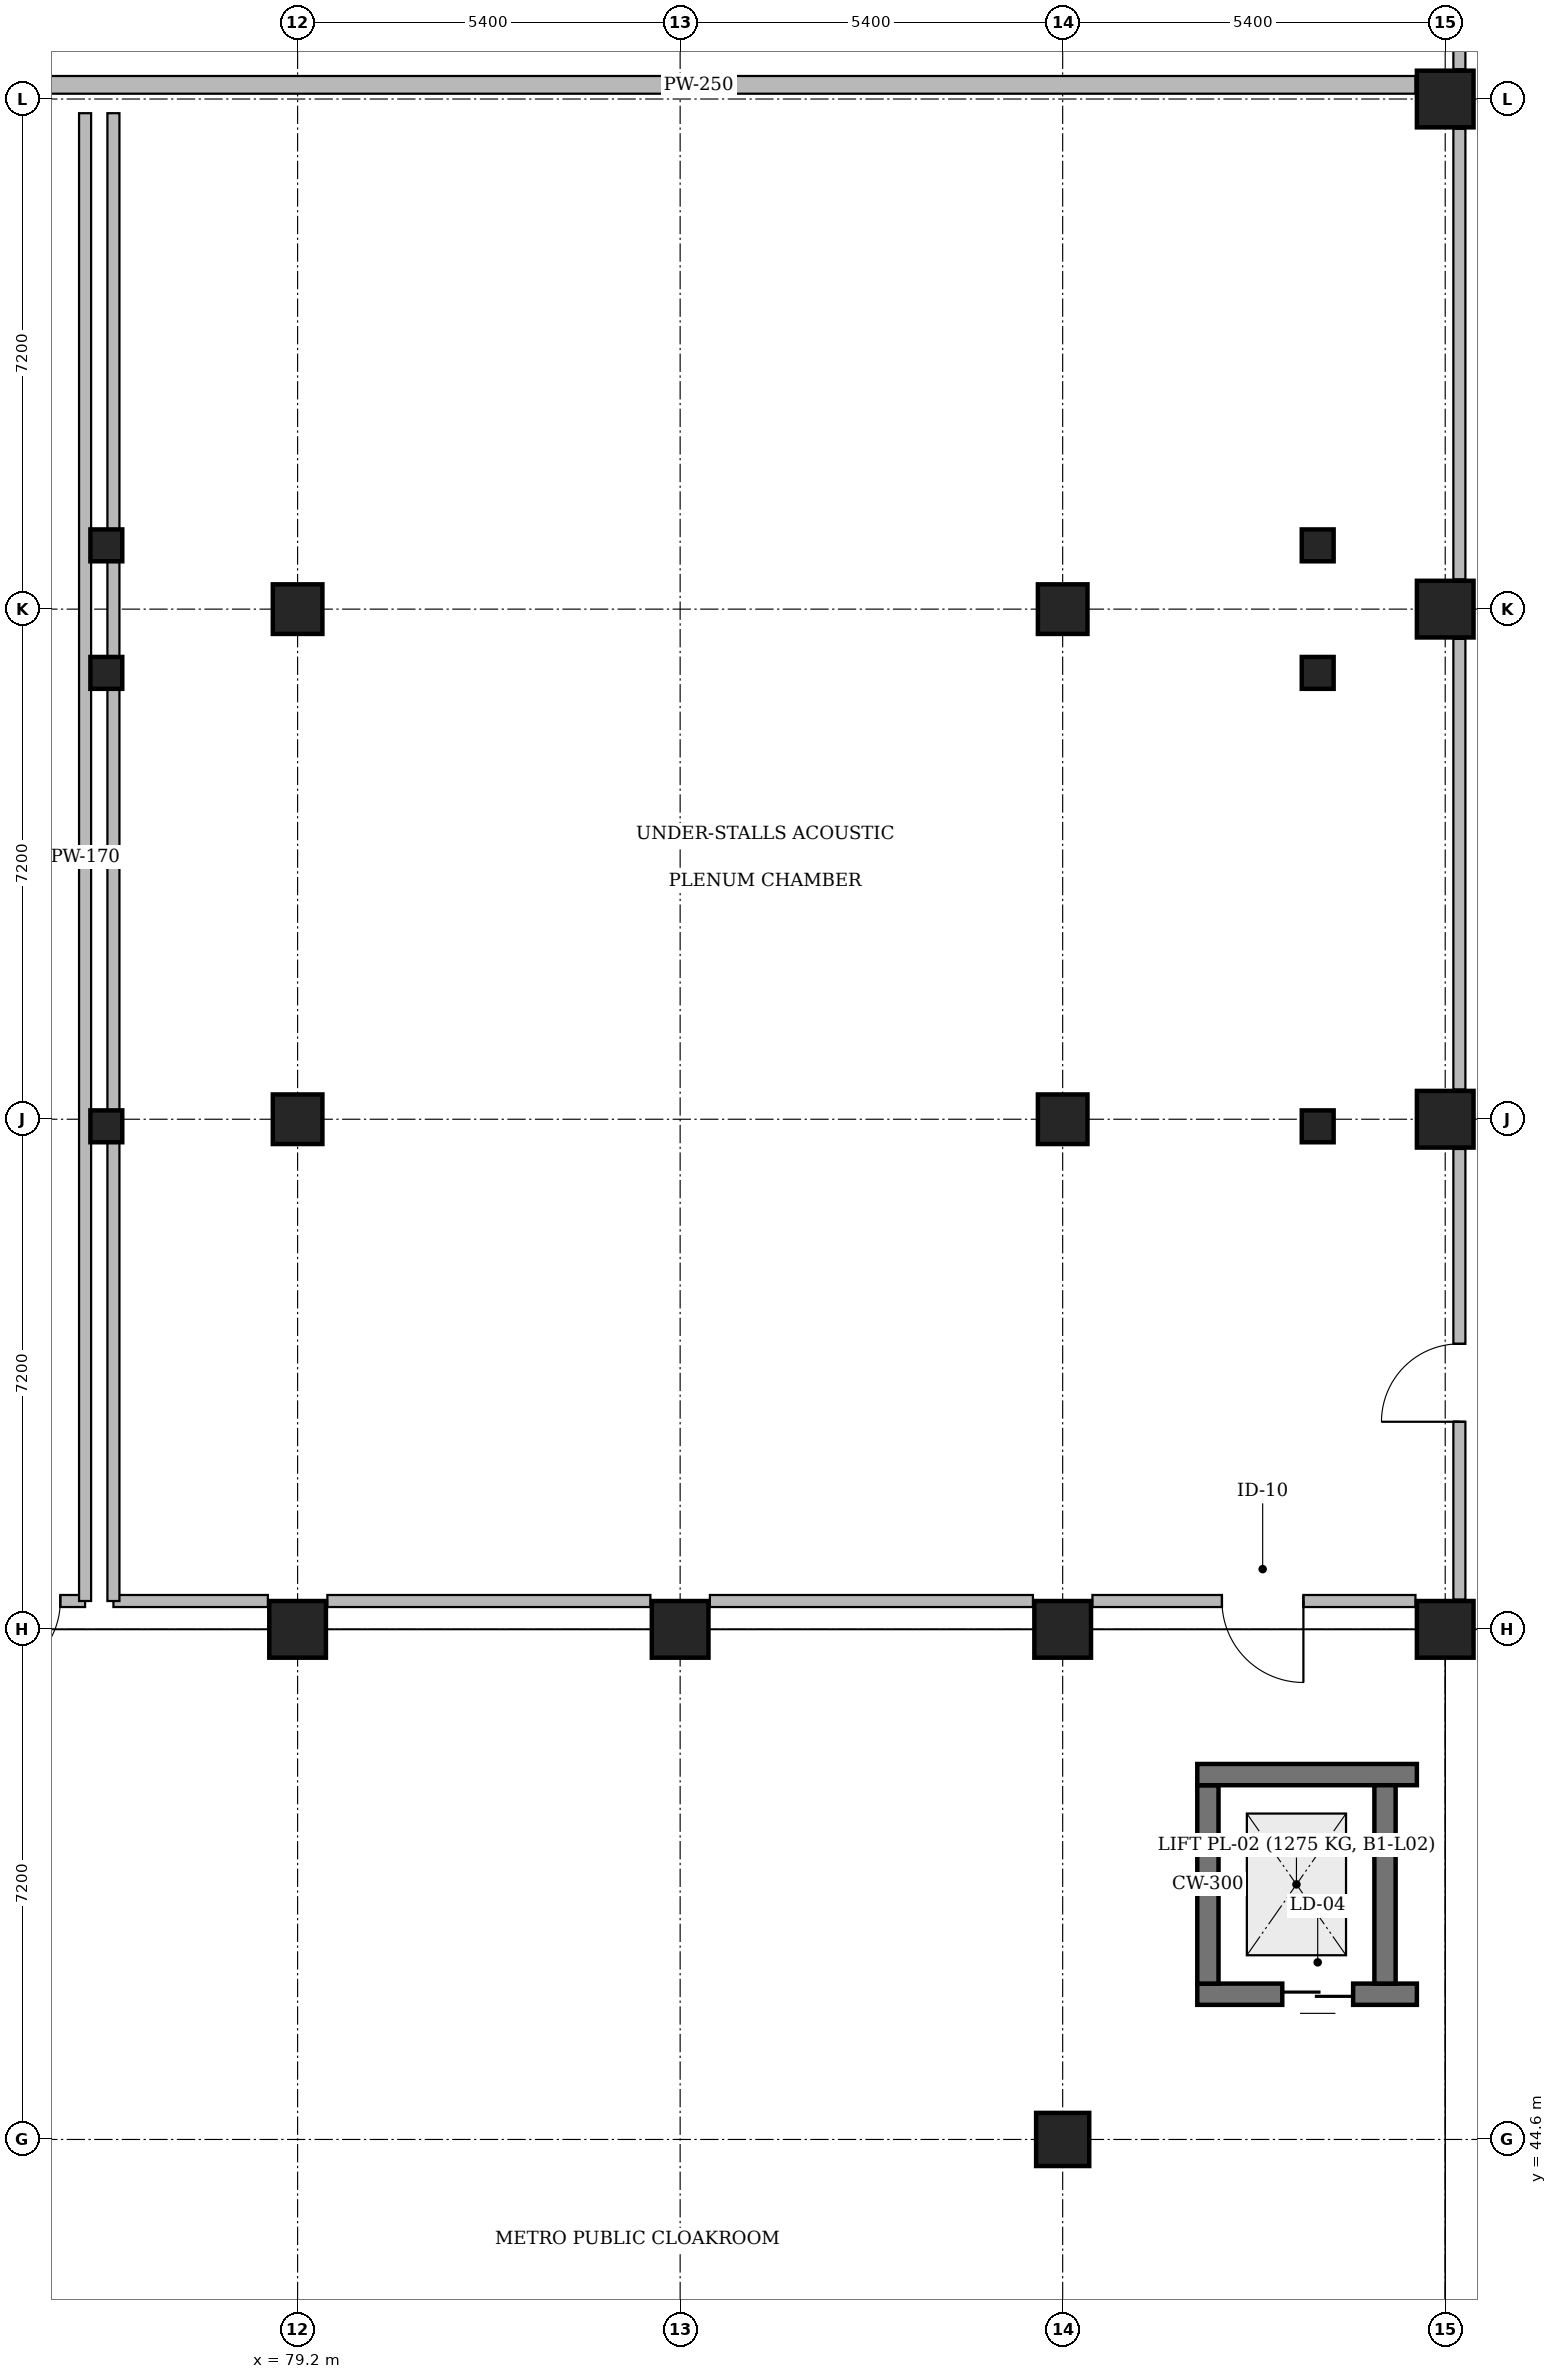
"""IFC4 building model, lengths in metres.
Left out: names, types, materials, properties, quantities, classifications, styles, units other than length and angle.
Written with IfcOpenShell. Run it as: python <this file> out.ifc"""

import sys

from ifc_helpers import new_model, si_unit, direction, frame, frame_2d, origin, origin_2d, place, context, subcontext, project, spatial, rectangle, circle, extrude, element, fill, save


model = new_model("IFC4")
c1 = context("Model", 3, precision=1e-05, world=origin(), true_north=direction((0.0, 1.0)))
c2 = subcontext(c1, "Body", "Model", "MODEL_VIEW")
j1 = project(units=[si_unit("LENGTHUNIT", "METRE"), si_unit("PLANEANGLEUNIT", "RADIAN")], contexts=[c1])
p1 = place(None, origin())
s1 = spatial("IfcSite", under=j1, at=p1, CompositionType="ELEMENT")
p2 = place(p1, origin())
s2 = spatial("IfcBuilding", under=s1, at=p2, CompositionType="ELEMENT")
p3 = place(p2, frame((0.0, 0.0, -4.8)))
s3 = spatial("IfcBuildingStorey", under=s2, at=p3, CompositionType="ELEMENT", Elevation=-4.8)
p4 = place(p3, frame((79.2, 51.8, 0.0), z_axis=(0.0, 0.0, 1.0), x_axis=(1.0, 0.0, 0.0)))
e1 = element("IfcColumn", 1, at=p4, inside=s3, PredefinedType="COLUMN", context=c2, shape_type="SweptSolid", body=[
    extrude(rectangle(XDim=0.8, YDim=0.8, at=origin_2d()), origin(), (0.0, 0.0, 1.0), 4.8),
])
for number, where, z_axis, x_axis in (
    (2, (79.2, 59.0, 0.0), (0.0, 0.0, 1.0), (1.0, 0.0, 0.0)),
    (3, (79.2, 66.2, 0.0), (0.0, 0.0, 1.0), (1.0, 0.0, 0.0)),
):
    element("IfcColumn", number, at=place(p3, frame(where, z_axis=z_axis, x_axis=x_axis)), inside=s3, PredefinedType="COLUMN", context=c2, shape_type="SweptSolid", body=[
        extrude(rectangle(XDim=0.7, YDim=0.7, at=origin_2d()), origin(), (0.0, 0.0, 1.0), 4.8),
    ])
p5 = place(p3, frame((84.6, 51.8, 0.0), z_axis=(0.0, 0.0, 1.0), x_axis=(1.0, 0.0, 0.0)))
e4 = element("IfcColumn", 4, at=p5, inside=s3, PredefinedType="COLUMN", context=c2, shape_type="SweptSolid", body=[
    extrude(rectangle(XDim=0.8, YDim=0.8, at=origin_2d()), origin(), (0.0, 0.0, 1.0), 4.8),
])
p6 = place(p3, frame((90.0, 44.6, 0.0), z_axis=(0.0, 0.0, 1.0), x_axis=(1.0, 0.0, 0.0)))
e5 = element("IfcColumn", 5, at=p6, inside=s3, PredefinedType="COLUMN", context=c2, shape_type="SweptSolid", body=[
    extrude(circle(Radius=0.375, at=origin_2d()), origin(), (0.0, 0.0, 1.0), 4.8),
])
p7 = place(p3, frame((90.0, 51.8, 0.0), z_axis=(0.0, 0.0, 1.0), x_axis=(1.0, 0.0, 0.0)))
e6 = element("IfcColumn", 6, at=p7, inside=s3, PredefinedType="COLUMN", context=c2, shape_type="SweptSolid", body=[
    extrude(rectangle(XDim=0.8, YDim=0.8, at=origin_2d()), origin(), (0.0, 0.0, 1.0), 4.8),
])
for number, where, z_axis, x_axis in (
    (7, (90.0, 59.0, 0.0), (0.0, 0.0, 1.0), (1.0, 0.0, 0.0)),
    (8, (90.0, 66.2, 0.0), (0.0, 0.0, 1.0), (1.0, 0.0, 0.0)),
):
    element("IfcColumn", number, at=place(p3, frame(where, z_axis=z_axis, x_axis=x_axis)), inside=s3, PredefinedType="COLUMN", context=c2, shape_type="SweptSolid", body=[
        extrude(rectangle(XDim=0.7, YDim=0.7, at=origin_2d()), origin(), (0.0, 0.0, 1.0), 4.8),
    ])
for number, where, z_axis, x_axis in (
    (9, (95.4, 51.8, 0.0), (0.0, 0.0, 1.0), (1.0, 0.0, 0.0)),
    (10, (95.4, 59.0, 0.0), (0.0, 0.0, 1.0), (1.0, 0.0, 0.0)),
    (11, (95.4, 66.2, 0.0), (0.0, 0.0, 1.0), (1.0, 0.0, 0.0)),
    (12, (95.4, 73.4, 0.0), (0.0, 0.0, 1.0), (1.0, 0.0, 0.0)),
):
    element("IfcColumn", number, at=place(p3, frame(where, z_axis=z_axis, x_axis=x_axis)), inside=s3, PredefinedType="COLUMN", context=c2, shape_type="SweptSolid", body=[
        extrude(rectangle(XDim=0.8, YDim=0.8, at=origin_2d()), origin(), (0.0, 0.0, 1.0), 4.8),
    ])
for number, where, z_axis, x_axis in (
    (13, (76.5, 67.1, 0.0), (0.0, 0.0, 1.0), (1.0, 0.0, 0.0)),
    (14, (93.6, 67.1, 0.0), (0.0, 0.0, 1.0), (1.0, 0.0, 0.0)),
    (15, (76.5, 65.3, 0.0), (0.0, 0.0, 1.0), (1.0, 0.0, 0.0)),
    (16, (93.6, 65.3, 0.0), (0.0, 0.0, 1.0), (1.0, 0.0, 0.0)),
    (17, (76.5, 58.9, 0.0), (0.0, 0.0, 1.0), (1.0, 0.0, 0.0)),
    (18, (93.6, 58.9, 0.0), (0.0, 0.0, 1.0), (1.0, 0.0, 0.0)),
):
    element("IfcColumn", number, at=place(p3, frame(where, z_axis=z_axis, x_axis=x_axis)), inside=s3, PredefinedType="COLUMN", context=c2, shape_type="SweptSolid", body=[
        extrude(rectangle(XDim=0.45, YDim=0.45, at=origin_2d()), origin(), (0.0, 0.0, 1.0), 4.8),
    ])
p8 = place(p3, frame((95.0, 46.65, 0.0), z_axis=(0.0, 0.0, 1.0), x_axis=(-1.0, 0.0, 0.0)))
e19 = element("IfcWall", 19, at=p8, inside=s3, PredefinedType="SOLIDWALL", context=c2, shape_type="SweptSolid", body=[
    extrude(rectangle(XDim=3.1, YDim=0.3, at=frame_2d((1.55, 0.0))), origin(), (0.0, 0.0, 1.0), 4.8),
])
p9 = place(p8, frame((0.9, 0.0, 0.0)))
e20 = element("IfcOpeningElement", 20, at=p9, cuts=e19, PredefinedType="OPENING", context=c2, shape_type="SweptSolid", body=[
    extrude(rectangle(XDim=1.0, YDim=2.1, at=frame_2d((0.5, 1.05))), frame((0.0, 0.17, 0.0), z_axis=(0.0, -1.0, 0.0), x_axis=(1.0, 0.0, 0.0)), (0.0, 0.0, 1.0), 0.34),
])
p10 = place(p3, frame((92.05, 46.8, 0.0), z_axis=(0.0, 0.0, 1.0), x_axis=(0.0, 1.0, 0.0)))
e21 = element("IfcWall", 21, at=p10, inside=s3, PredefinedType="SOLIDWALL", context=c2, shape_type="SweptSolid", body=[
    extrude(rectangle(XDim=2.8, YDim=0.3, at=frame_2d((1.4, 0.0))), origin(), (0.0, 0.0, 1.0), 4.8),
])
p11 = place(p3, frame((91.9, 49.75, 0.0), z_axis=(0.0, 0.0, 1.0), x_axis=(1.0, 0.0, 0.0)))
e22 = element("IfcWall", 22, at=p11, inside=s3, PredefinedType="SOLIDWALL", context=c2, shape_type="SweptSolid", body=[
    extrude(rectangle(XDim=3.1, YDim=0.3, at=frame_2d((1.55, 0.0))), origin(), (0.0, 0.0, 1.0), 4.8),
])
p12 = place(p3, frame((94.55, 49.6, 0.0), z_axis=(0.0, 0.0, 1.0), x_axis=(0.0, -1.0, 0.0)))
e23 = element("IfcWall", 23, at=p12, inside=s3, PredefinedType="SOLIDWALL", context=c2, shape_type="SweptSolid", body=[
    extrude(rectangle(XDim=2.8, YDim=0.3, at=frame_2d((1.4, 0.0))), origin(), (0.0, 0.0, 1.0), 4.8),
])
p13 = place(p3, frame((94.98, 73.6, 0.0), z_axis=(0.0, 0.0, 1.0), x_axis=(-1.0, 0.0, 0.0)))
e24 = element("IfcWall", 24, at=p13, inside=s3, PredefinedType="PARTITIONING", context=c2, shape_type="SweptSolid", body=[
    extrude(rectangle(XDim=36.96, YDim=0.25, at=frame_2d((18.48, 0.0))), origin(), (0.0, 0.0, 1.0), 4.52),
])
p14 = place(p13, frame((20.24, 0.0, 0.0)))
e25 = element("IfcOpeningElement", 25, at=p14, cuts=e24, PredefinedType="OPENING", context=c2, shape_type="SweptSolid", body=[
    extrude(rectangle(XDim=1.95, YDim=2.4, at=frame_2d((0.975, 1.2))), frame((0.0, 0.145, 0.0), z_axis=(0.0, -1.0, 0.0), x_axis=(1.0, 0.0, 0.0)), (0.0, 0.0, 1.0), 0.29),
])
p15 = place(p3, frame((76.2, 52.2, 0.0), z_axis=(0.0, 0.0, 1.0), x_axis=(-1.0, 0.0, 0.0)))
e26 = element("IfcWall", 26, at=p15, inside=s3, PredefinedType="PARTITIONING", context=c2, shape_type="SweptSolid", body=[
    extrude(rectangle(XDim=1.98, YDim=0.17, at=frame_2d((0.99, 0.0))), origin(), (0.0, 0.0, 1.0), 3.84),
])
p16 = place(p15, frame((0.35, 0.0, 0.0)))
e27 = element("IfcOpeningElement", 27, at=p16, cuts=e26, PredefinedType="OPENING", context=c2, shape_type="SweptSolid", body=[
    extrude(rectangle(XDim=1.1, YDim=2.1, at=frame_2d((0.55, 1.05))), frame((0.0, 0.105, 0.0), z_axis=(0.0, -1.0, 0.0), x_axis=(1.0, 0.0, 0.0)), (0.0, 0.0, 1.0), 0.21),
])
p17 = place(p3, frame((76.2, 73.2, 0.0), z_axis=(0.0, 0.0, 1.0), x_axis=(0.0, -1.0, 0.0)))
e28 = element("IfcWall", 28, at=p17, inside=s3, PredefinedType="PARTITIONING", context=c2, shape_type="SweptSolid", body=[
    extrude(rectangle(XDim=21.0, YDim=0.17, at=frame_2d((10.5, 0.0))), origin(), (0.0, 0.0, 1.0), 4.04),
])
p18 = place(p3, frame((94.98, 52.2, 0.0), z_axis=(0.0, 0.0, 1.0), x_axis=(-1.0, 0.0, 0.0)))
e29 = element("IfcWall", 29, at=p18, inside=s3, PredefinedType="PARTITIONING", context=c2, shape_type="SweptSolid", body=[
    extrude(rectangle(XDim=4.56, YDim=0.17, at=frame_2d((2.28, 0.0))), origin(), (0.0, 0.0, 1.0), 3.84),
])
p19 = place(p18, frame((1.582, 0.0, 0.0)))
e30 = element("IfcOpeningElement", 30, at=p19, cuts=e29, PredefinedType="OPENING", context=c2, shape_type="SweptSolid", body=[
    extrude(rectangle(XDim=1.15, YDim=2.15, at=frame_2d((0.575, 1.075))), frame((0.0, 0.105, 0.0), z_axis=(0.0, -1.0, 0.0), x_axis=(1.0, 0.0, 0.0)), (0.0, 0.0, 1.0), 0.21),
])
p20 = place(p3, frame((89.58, 52.2, 0.0), z_axis=(0.0, 0.0, 1.0), x_axis=(-1.0, 0.0, 0.0)))
e31 = element("IfcWall", 31, at=p20, inside=s3, PredefinedType="PARTITIONING", context=c2, shape_type="SweptSolid", body=[
    extrude(rectangle(XDim=4.56, YDim=0.17, at=frame_2d((2.28, 0.0))), origin(), (0.0, 0.0, 1.0), 3.84),
])
p21 = place(p3, frame((84.18, 52.2, 0.0), z_axis=(0.0, 0.0, 1.0), x_axis=(-1.0, 0.0, 0.0)))
e32 = element("IfcWall", 32, at=p21, inside=s3, PredefinedType="PARTITIONING", context=c2, shape_type="SweptSolid", body=[
    extrude(rectangle(XDim=4.56, YDim=0.17, at=frame_2d((2.28, 0.0))), origin(), (0.0, 0.0, 1.0), 3.84),
])
p22 = place(p3, frame((78.78, 52.2, 0.0), z_axis=(0.0, 0.0, 1.0), x_axis=(-1.0, 0.0, 0.0)))
e33 = element("IfcWall", 33, at=p22, inside=s3, PredefinedType="PARTITIONING", context=c2, shape_type="SweptSolid", body=[
    extrude(rectangle(XDim=2.18, YDim=0.17, at=frame_2d((1.09, 0.0))), origin(), (0.0, 0.0, 1.0), 3.84),
])
p23 = place(p3, frame((76.6, 52.2, 0.0), z_axis=(0.0, 0.0, 1.0), x_axis=(0.0, 1.0, 0.0)))
e34 = element("IfcWall", 34, at=p23, inside=s3, PredefinedType="PARTITIONING", context=c2, shape_type="SweptSolid", body=[
    extrude(rectangle(XDim=21.0, YDim=0.17, at=frame_2d((10.5, 0.0))), origin(), (0.0, 0.0, 1.0), 4.04),
])
p24 = place(p3, frame((95.6, 52.22, 0.0), z_axis=(0.0, 0.0, 1.0), x_axis=(0.0, 1.0, 0.0)))
e35 = element("IfcWall", 35, at=p24, inside=s3, PredefinedType="PARTITIONING", context=c2, shape_type="SweptSolid", body=[
    extrude(rectangle(XDim=6.36, YDim=0.17, at=frame_2d((3.18, 0.0))), origin(), (0.0, 0.0, 1.0), 3.84),
])
p25 = place(p24, frame((2.51, 0.0, 0.0)))
e36 = element("IfcOpeningElement", 36, at=p25, cuts=e35, PredefinedType="OPENING", context=c2, shape_type="SweptSolid", body=[
    extrude(rectangle(XDim=1.1, YDim=2.1, at=frame_2d((0.55, 1.05))), frame((0.0, 0.105, 0.0), z_axis=(0.0, -1.0, 0.0), x_axis=(1.0, 0.0, 0.0)), (0.0, 0.0, 1.0), 0.21),
])
p26 = place(p3, frame((95.6, 59.42, 0.0), z_axis=(0.0, 0.0, 1.0), x_axis=(0.0, 1.0, 0.0)))
e37 = element("IfcWall", 37, at=p26, inside=s3, PredefinedType="PARTITIONING", context=c2, shape_type="SweptSolid", body=[
    extrude(rectangle(XDim=6.36, YDim=0.17, at=frame_2d((3.18, 0.0))), origin(), (0.0, 0.0, 1.0), 3.84),
])
for number, where, z_axis, x_axis in (
    (38, (95.6, 66.62, 0.0), (0.0, 0.0, 1.0), (0.0, 1.0, 0.0)),
    (39, (95.6, 73.82, 0.0), (0.0, 0.0, 1.0), (0.0, 1.0, 0.0)),
):
    element("IfcWall", number, at=place(p3, frame(where, z_axis=z_axis, x_axis=x_axis)), inside=s3, PredefinedType="PARTITIONING", context=c2, shape_type="SweptSolid", body=[
        extrude(rectangle(XDim=6.36, YDim=0.17, at=frame_2d((3.18, 0.0))), origin(), (0.0, 0.0, 1.0), 3.84),
    ])
p27 = place(p9, origin())
e40 = element("IfcDoor", 40, at=p27, inside=s3, OperationType="DOUBLE_DOOR_SLIDING", PredefinedType="DOOR", context=c2, shape_type="SweptSolid", body=[
    extrude(rectangle(XDim=1.0, YDim=2.1, at=frame_2d((0.5, 1.05))), frame((0.0, 0.025, 0.0), z_axis=(0.0, -1.0, 0.0), x_axis=(1.0, 0.0, 0.0)), (0.0, 0.0, 1.0), 0.05),
])
fill(e20, e40)
p28 = place(p16, origin())
e41 = element("IfcDoor", 41, at=p28, inside=s3, OperationType="SINGLE_SWING_RIGHT", PredefinedType="DOOR", context=c2, shape_type="SweptSolid", body=[
    extrude(rectangle(XDim=1.1, YDim=2.1, at=frame_2d((0.55, 1.05))), frame((0.0, 0.025, 0.0), z_axis=(0.0, -1.0, 0.0), x_axis=(1.0, 0.0, 0.0)), (0.0, 0.0, 1.0), 0.05),
])
fill(e27, e41)
p29 = place(p19, origin())
e42 = element("IfcDoor", 42, at=p29, inside=s3, OperationType="SINGLE_SWING_LEFT", PredefinedType="DOOR", context=c2, shape_type="SweptSolid", body=[
    extrude(rectangle(XDim=1.15, YDim=2.15, at=frame_2d((0.575, 1.075))), frame((0.0, 0.025, 0.0), z_axis=(0.0, -1.0, 0.0), x_axis=(1.0, 0.0, 0.0)), (0.0, 0.0, 1.0), 0.05),
])
fill(e30, e42)
p30 = place(p25, origin())
e43 = element("IfcDoor", 43, at=p30, inside=s3, OperationType="SINGLE_SWING_LEFT", PredefinedType="DOOR", context=c2, shape_type="SweptSolid", body=[
    extrude(rectangle(XDim=1.1, YDim=2.1, at=frame_2d((0.55, 1.05))), frame((0.0, 0.025, 0.0), z_axis=(0.0, -1.0, 0.0), x_axis=(1.0, 0.0, 0.0)), (0.0, 0.0, 1.0), 0.05),
])
fill(e36, e43)
save(model, sys.argv[1])
